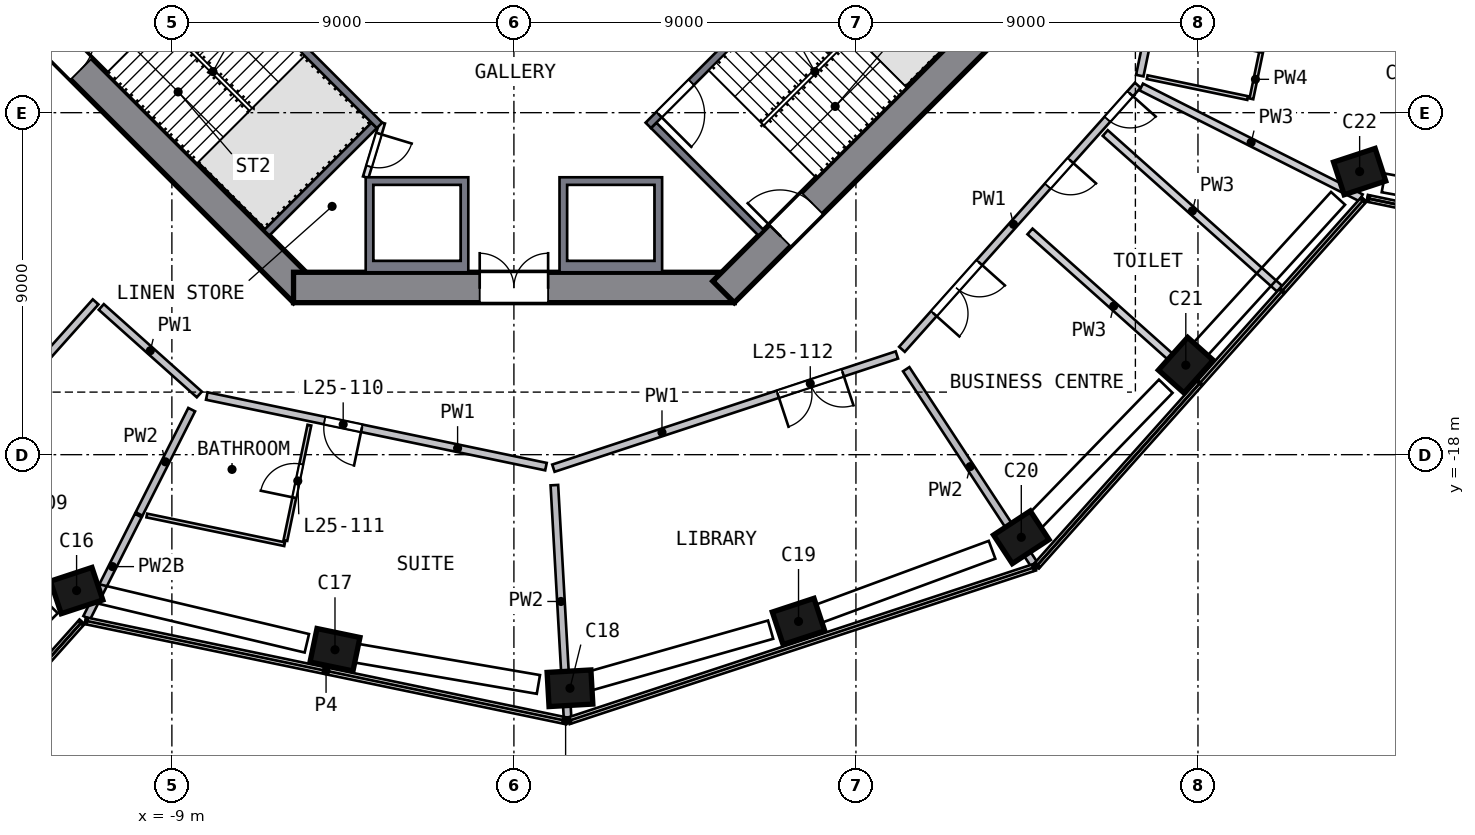
"""IFC4 building model, lengths in metres.
Left out: names, types, materials, properties, quantities, classifications, styles, units other than length and angle.
Written with IfcOpenShell. Run it as: python <this file> out.ifc"""

import sys

from ifc_helpers import new_model, si_unit, direction, frame, frame_2d, origin, origin_2d, place, context, subcontext, project, spatial, polyline, rectangle, outline, extrude, element, fill, save


model = new_model("IFC4")
c1 = context("Model", 3, precision=1e-05, world=origin(), true_north=direction((0.0, 1.0)))
c2 = subcontext(c1, "Body", "Model", "MODEL_VIEW")
j1 = project(units=[si_unit("LENGTHUNIT", "METRE"), si_unit("PLANEANGLEUNIT", "RADIAN")], contexts=[c1])
p1 = place(None, origin())
s1 = spatial("IfcSite", under=j1, at=p1, CompositionType="ELEMENT")
p2 = place(p1, origin())
s2 = spatial("IfcBuilding", under=s1, at=p2, CompositionType="ELEMENT")
p3 = place(p2, frame((0.0, 0.0, 107.0)))
s3 = spatial("IfcBuildingStorey", under=s2, at=p3, CompositionType="ELEMENT", Elevation=107.0)
p4 = place(p3, frame((-11.604, -21.525, 0.0), z_axis=(0.080137214, -0.042360729, 0.995883324), x_axis=(-0.946654036, -0.31608699, 0.062730784)))
e1 = element("IfcColumn", 1, at=p4, inside=s3, PredefinedType="COLUMN", context=c2, shape_type="SweptSolid", body=[
    extrude(rectangle(XDim=1.15, YDim=0.9, at=origin_2d()), origin(), (0.0, 0.0, 1.0), 4.207),
])
p5 = place(p3, frame((-4.812, -23.113, 0.0), z_axis=(0.085905551, -0.017123066, 0.996156131), x_axis=(0.975259529, -0.20296904, -0.087592353)))
e2 = element("IfcColumn", 2, at=p5, inside=s3, PredefinedType="COLUMN", context=c2, shape_type="SweptSolid", body=[
    extrude(rectangle(XDim=1.15, YDim=0.9, at=origin_2d()), origin(), (0.0, 0.0, 1.0), 4.206),
])
p6 = place(p3, frame((1.367, -24.154, 0.0), z_axis=(0.089545204, 0.005861352, 0.995965512), x_axis=(-0.994352891, -0.056658618, 0.089733658)))
e3 = element("IfcColumn", 3, at=p6, inside=s3, PredefinedType="COLUMN", context=c2, shape_type="SweptSolid", body=[
    extrude(rectangle(XDim=1.15, YDim=0.9, at=origin_2d()), origin(), (0.0, 0.0, 1.0), 4.207),
])
p7 = place(p3, frame((7.389, -22.422, 0.0), z_axis=(0.08294545, 0.02809349, 0.996158024), x_axis=(0.946173645, 0.311587523, -0.087570825)))
e4 = element("IfcColumn", 4, at=p7, inside=s3, PredefinedType="COLUMN", context=c2, shape_type="SweptSolid", body=[
    extrude(rectangle(XDim=1.15, YDim=0.9, at=origin_2d()), origin(), (0.0, 0.0, 1.0), 4.206),
])
p8 = place(p3, frame((13.261, -20.234, 0.0), z_axis=(0.074688522, 0.049792348, 0.995963025), x_axis=(-0.833327402, -0.545443267, 0.089761257)))
e5 = element("IfcColumn", 5, at=p8, inside=s3, PredefinedType="COLUMN", context=c2, shape_type="SweptSolid", body=[
    extrude(rectangle(XDim=1.15, YDim=0.9, at=origin_2d()), origin(), (0.0, 0.0, 1.0), 4.207),
])
p9 = place(p3, frame((17.61, -15.723, 0.0), z_axis=(0.057812061, 0.065822166, 0.996155213), x_axis=(0.663669485, 0.742878568, -0.087602791)))
e6 = element("IfcColumn", 6, at=p9, inside=s3, PredefinedType="COLUMN", context=c2, shape_type="SweptSolid", body=[
    extrude(rectangle(XDim=1.15, YDim=0.9, at=origin_2d()), origin(), (0.0, 0.0, 1.0), 4.206),
])
p10 = place(p3, frame((22.208, -10.65, 0.0), z_axis=(0.038760753, 0.082627714, 0.995826423), x_axis=(-0.9491427, -0.308570905, 0.062547039)))
e7 = element("IfcColumn", 7, at=p10, inside=s3, PredefinedType="COLUMN", context=c2, shape_type="SweptSolid", body=[
    extrude(rectangle(XDim=1.15, YDim=0.9, at=origin_2d()), origin(), (0.0, 0.0, 1.0), 4.208),
])
p11 = place(p3, frame((-13.717, -5.516, 0.0), z_axis=(0.0, 0.0, 1.0), x_axis=(0.707106781, -0.707106781, 0.0)))
e8 = element("IfcWall", 8, at=p11, inside=s3, PredefinedType="SHEAR", context=c2, shape_type="SweptSolid", body=[
    extrude(rectangle(XDim=11.598, YDim=0.8, at=frame_2d((5.799, 0.0))), origin(), (0.0, 0.0, 1.0), 4.5),
])
p12 = place(p11, frame((2.099, 0.0, 0.0)))
e9 = element("IfcOpeningElement", 9, at=p12, cuts=e8, PredefinedType="OPENING", context=c2, shape_type="SweptSolid", body=[
    extrude(rectangle(XDim=1.2, YDim=2.1, at=frame_2d((0.6, 1.05))), frame((0.0, 0.41, 0.0), z_axis=(0.0, -1.0, 0.0), x_axis=(1.0, 0.0, 0.0)), (0.0, 0.0, 1.0), 0.82),
])
p13 = place(p3, frame((-5.799, -13.6, 0.0), z_axis=(0.0, 0.0, 1.0), x_axis=(1.0, 0.0, 0.0)))
e10 = element("IfcWall", 10, at=p13, inside=s3, PredefinedType="SHEAR", context=c2, shape_type="SweptSolid", body=[
    extrude(rectangle(XDim=11.598, YDim=0.8, at=frame_2d((5.799, 0.0))), origin(), (0.0, 0.0, 1.0), 4.5),
])
p14 = place(p13, frame((4.899, 0.0, 0.0)))
e11 = element("IfcOpeningElement", 11, at=p14, cuts=e10, PredefinedType="OPENING", context=c2, shape_type="SweptSolid", body=[
    extrude(rectangle(XDim=1.8, YDim=2.1, at=frame_2d((0.9, 1.05))), frame((0.0, 0.41, 0.0), z_axis=(0.0, -1.0, 0.0), x_axis=(1.0, 0.0, 0.0)), (0.0, 0.0, 1.0), 0.82),
])
p15 = place(p3, frame((5.516, -13.717, 0.0), z_axis=(0.0, 0.0, 1.0), x_axis=(0.707106781, 0.707106781, 0.0)))
e12 = element("IfcWall", 12, at=p15, inside=s3, PredefinedType="SHEAR", context=c2, shape_type="SweptSolid", body=[
    extrude(rectangle(XDim=11.598, YDim=0.8, at=frame_2d((5.799, 0.0))), origin(), (0.0, 0.0, 1.0), 4.5),
])
p16 = place(p15, frame((2.099, 0.0, 0.0)))
e13 = element("IfcOpeningElement", 13, at=p16, cuts=e12, PredefinedType="OPENING", context=c2, shape_type="SweptSolid", body=[
    extrude(rectangle(XDim=1.2, YDim=2.1, at=frame_2d((0.6, 1.05))), frame((0.0, 0.41, 0.0), z_axis=(0.0, -1.0, 0.0), x_axis=(1.0, 0.0, 0.0)), (0.0, 0.0, 1.0), 0.82),
])
p17 = place(p3, origin())
e14 = element("IfcWall", 14, at=p17, inside=s3, PredefinedType="SOLIDWALL", context=c2, shape_type="SweptSolid", body=[
    extrude(outline(polyline([(-1.2, -13.2), (-3.9, -13.2), (-3.9, -10.7), (-1.2, -10.7), (-1.2, -13.2)]), holes=[polyline([(-3.7, -10.9), (-3.7, -12.9), (-1.4, -12.9), (-1.4, -10.9), (-3.7, -10.9)])]), origin(), (0.0, 0.0, 1.0), 4.19),
])
p18 = place(p3, origin())
e15 = element("IfcWall", 15, at=p18, inside=s3, PredefinedType="SOLIDWALL", context=c2, shape_type="SweptSolid", body=[
    extrude(outline(polyline([(3.9, -10.7), (3.9, -13.2), (1.2, -13.2), (1.2, -10.7), (3.9, -10.7)]), holes=[polyline([(1.4, -12.9), (3.7, -12.9), (3.7, -10.9), (1.4, -10.9), (1.4, -12.9)])]), origin(), (0.0, 0.0, 1.0), 4.19),
])
p19 = place(p3, frame((-3.535, -9.334, 0.0), z_axis=(0.0, 0.0, 1.0), x_axis=(-0.707106781, 0.707106781, 0.0)))
e16 = element("IfcWall", 16, at=p19, inside=s3, PredefinedType="SOLIDWALL", context=c2, shape_type="SweptSolid", body=[
    extrude(rectangle(XDim=8.2, YDim=0.2, at=frame_2d((4.1, 0.0))), origin(), (0.0, 0.0, 1.0), 4.19),
])
p20 = place(p19, frame((6.6, 0.0, 0.0)))
e17 = element("IfcOpeningElement", 17, at=p20, cuts=e16, PredefinedType="OPENING", context=c2, shape_type="SweptSolid", body=[
    extrude(rectangle(XDim=1.2, YDim=2.1, at=frame_2d((0.6, 1.05))), frame((0.0, 0.11, 0.0), z_axis=(0.0, -1.0, 0.0), x_axis=(1.0, 0.0, 0.0)), (0.0, 0.0, 1.0), 0.22),
])
p21 = place(p3, frame((-3.677, -9.334, 0.0), z_axis=(0.0, 0.0, 1.0), x_axis=(-0.707106781, -0.707106781, 0.0)))
e18 = element("IfcWall", 18, at=p21, inside=s3, PredefinedType="SOLIDWALL", context=c2, shape_type="SweptSolid", body=[
    extrude(rectangle(XDim=4.0, YDim=0.2, at=frame_2d((2.0, 0.0))), origin(), (0.0, 0.0, 1.0), 4.19),
])
p22 = place(p3, frame((9.334, -3.535, 0.0), z_axis=(0.0, 0.0, 1.0), x_axis=(-0.707106781, -0.707106781, 0.0)))
e19 = element("IfcWall", 19, at=p22, inside=s3, PredefinedType="SOLIDWALL", context=c2, shape_type="SweptSolid", body=[
    extrude(rectangle(XDim=8.2, YDim=0.2, at=frame_2d((4.1, 0.0))), origin(), (0.0, 0.0, 1.0), 4.19),
])
p23 = place(p22, frame((6.6, 0.0, 0.0)))
e20 = element("IfcOpeningElement", 20, at=p23, cuts=e19, PredefinedType="OPENING", context=c2, shape_type="SweptSolid", body=[
    extrude(rectangle(XDim=1.2, YDim=2.1, at=frame_2d((0.6, 1.05))), frame((0.0, 0.11, 0.0), z_axis=(0.0, -1.0, 0.0), x_axis=(1.0, 0.0, 0.0)), (0.0, 0.0, 1.0), 0.22),
])
p24 = place(p3, frame((3.677, -9.334, 0.0), z_axis=(0.0, 0.0, 1.0), x_axis=(0.707106781, -0.707106781, 0.0)))
e21 = element("IfcWall", 21, at=p24, inside=s3, PredefinedType="SOLIDWALL", context=c2, shape_type="SweptSolid", body=[
    extrude(rectangle(XDim=4.0, YDim=0.2, at=frame_2d((2.0, 0.0))), origin(), (0.0, 0.0, 1.0), 4.19),
])
p25 = place(p3, frame((-3.465, -9.263, 0.0), z_axis=(0.0, 0.0, 1.0), x_axis=(-0.289808785, -0.957084567, 0.0)))
e22 = element("IfcWall", 22, at=p25, inside=s3, PredefinedType="PARTITIONING", context=c2, shape_type="SweptSolid", body=[
    extrude(rectangle(XDim=1.501, YDim=0.15, at=frame_2d((0.75, 0.0))), origin(), (0.0, 0.0, 1.0), 4.19),
])
p26 = place(p25, frame((0.301, 0.0, 0.0)))
e23 = element("IfcOpeningElement", 23, at=p26, cuts=e22, PredefinedType="OPENING", context=c2, shape_type="SweptSolid", body=[
    extrude(rectangle(XDim=0.9, YDim=2.1, at=frame_2d((0.45, 1.05))), frame((0.0, 0.085, 0.0), z_axis=(0.0, -1.0, 0.0), x_axis=(1.0, 0.0, 0.0)), (0.0, 0.0, 1.0), 0.17),
])
p27 = place(p3, frame((-11.007, -13.979, 0.0), z_axis=(0.0, 0.0, 1.0), x_axis=(-0.666010793, -0.745942105, 0.0)))
e24 = element("IfcWall", 24, at=p27, inside=s3, PredefinedType="SOLIDWALL", context=c2, shape_type="SweptSolid", body=[
    extrude(rectangle(XDim=16.573, YDim=0.2, at=frame_2d((8.287, 0.0))), origin(), (0.0, 0.0, 1.0), 4.19),
])
p28 = place(p27, frame((4.15, 0.0, 0.0)))
e25 = element("IfcOpeningElement", 25, at=p28, cuts=e24, PredefinedType="OPENING", context=c2, shape_type="SweptSolid", body=[
    extrude(rectangle(XDim=1.8, YDim=2.1, at=frame_2d((0.9, 1.05))), frame((0.0, 0.11, 0.0), z_axis=(0.0, -1.0, 0.0), x_axis=(1.0, 0.0, 0.0)), (0.0, 0.0, 1.0), 0.22),
])
p29 = place(p3, frame((-10.857, -14.113, 0.0), z_axis=(0.0, 0.0, 1.0), x_axis=(0.745935156, -0.666018575, 0.0)))
e26 = element("IfcWall", 26, at=p29, inside=s3, PredefinedType="SOLIDWALL", context=c2, shape_type="SweptSolid", body=[
    extrude(rectangle(XDim=3.458, YDim=0.2, at=frame_2d((1.729, 0.0))), origin(), (0.0, 0.0, 1.0), 4.19),
])
p30 = place(p3, frame((0.843, -18.315, 0.0), z_axis=(0.0, 0.0, 1.0), x_axis=(-0.979008482, 0.203819508, 0.0)))
e27 = element("IfcWall", 27, at=p30, inside=s3, PredefinedType="SOLIDWALL", context=c2, shape_type="SweptSolid", body=[
    extrude(rectangle(XDim=9.117, YDim=0.2, at=frame_2d((4.558, 0.0))), origin(), (0.0, 0.0, 1.0), 4.19),
])
p31 = place(p30, frame((4.95, 0.0, 0.0)))
e28 = element("IfcOpeningElement", 28, at=p31, cuts=e27, PredefinedType="OPENING", context=c2, shape_type="SweptSolid", body=[
    extrude(rectangle(XDim=1.0, YDim=2.1, at=frame_2d((0.5, 1.05))), frame((0.0, 0.11, 0.0), z_axis=(0.0, -1.0, 0.0), x_axis=(1.0, 0.0, 0.0)), (0.0, 0.0, 1.0), 0.22),
])
p32 = place(p3, frame((10.077, -15.377, 0.0), z_axis=(0.0, 0.0, 1.0), x_axis=(-0.949750196, -0.313008891, 0.0)))
e29 = element("IfcWall", 29, at=p32, inside=s3, PredefinedType="SOLIDWALL", context=c2, shape_type="SweptSolid", body=[
    extrude(rectangle(XDim=9.517, YDim=0.2, at=frame_2d((4.758, 0.0))), origin(), (0.0, 0.0, 1.0), 4.19),
])
p33 = place(p32, frame((1.5, 0.0, 0.0)))
e30 = element("IfcOpeningElement", 30, at=p33, cuts=e29, PredefinedType="OPENING", context=c2, shape_type="SweptSolid", body=[
    extrude(rectangle(XDim=1.8, YDim=2.1, at=frame_2d((0.9, 1.05))), frame((0.0, 0.11, 0.0), z_axis=(0.0, -1.0, 0.0), x_axis=(1.0, 0.0, 0.0)), (0.0, 0.0, 1.0), 0.22),
])
p34 = place(p3, frame((16.416, -8.278, 0.0), z_axis=(0.0, 0.0, 1.0), x_axis=(-0.666014728, -0.745938592, 0.0)))
e31 = element("IfcWall", 31, at=p34, inside=s3, PredefinedType="SOLIDWALL", context=c2, shape_type="SweptSolid", body=[
    extrude(rectangle(XDim=9.317, YDim=0.2, at=frame_2d((4.658, 0.0))), origin(), (0.0, 0.0, 1.0), 4.19),
])
p35 = place(p34, frame((6.258, 0.0, 0.0)))
e32 = element("IfcOpeningElement", 32, at=p35, cuts=e31, PredefinedType="OPENING", context=c2, shape_type="SweptSolid", body=[
    extrude(rectangle(XDim=1.8, YDim=2.1, at=frame_2d((0.9, 1.05))), frame((0.0, 0.11, 0.0), z_axis=(0.0, -1.0, 0.0), x_axis=(1.0, 0.0, 0.0)), (0.0, 0.0, 1.0), 0.22),
])
p36 = place(p34, frame((2.658, 0.0, 0.0)))
e33 = element("IfcOpeningElement", 33, at=p36, cuts=e31, PredefinedType="OPENING", context=c2, shape_type="SweptSolid", body=[
    extrude(rectangle(XDim=0.9, YDim=2.1, at=frame_2d((0.45, 1.05))), frame((0.0, 0.11, 0.0), z_axis=(0.0, -1.0, 0.0), x_axis=(1.0, 0.0, 0.0)), (0.0, 0.0, 1.0), 0.22),
])
p37 = place(p34, frame((0.3, 0.0, 0.0)))
e34 = element("IfcOpeningElement", 34, at=p37, cuts=e31, PredefinedType="OPENING", context=c2, shape_type="SweptSolid", body=[
    extrude(rectangle(XDim=0.9, YDim=2.1, at=frame_2d((0.45, 1.05))), frame((0.0, 0.11, 0.0), z_axis=(0.0, -1.0, 0.0), x_axis=(1.0, 0.0, 0.0)), (0.0, 0.0, 1.0), 0.22),
])
p38 = place(p3, frame((16.469, -8.025, 0.0), z_axis=(0.0, 0.0, 1.0), x_axis=(0.203787936, 0.979015055, 0.0)))
e35 = element("IfcWall", 35, at=p38, inside=s3, PredefinedType="SOLIDWALL", context=c2, shape_type="SweptSolid", body=[
    extrude(rectangle(XDim=3.4, YDim=0.2, at=frame_2d((1.7, 0.0))), origin(), (0.0, 0.0, 1.0), 4.19),
])
p39 = place(p3, frame((-9.884, -19.602, 0.0), z_axis=(0.0, 0.0, 1.0), x_axis=(-0.450291801, -0.892881456, 0.0)))
e36 = element("IfcWall", 36, at=p39, inside=s3, PredefinedType="SOLIDWALL", context=c2, shape_type="SweptSolid", body=[
    extrude(rectangle(XDim=3.011, YDim=0.2, at=frame_2d((1.506, 0.0))), origin(), (0.0, 0.0, 1.0), 3.69),
])
p40 = place(p3, frame((-8.479, -16.815, 0.0), z_axis=(0.0, 0.0, 1.0), x_axis=(-0.450228455, -0.892913399, 0.0)))
e37 = element("IfcWall", 37, at=p40, inside=s3, PredefinedType="SOLIDWALL", context=c2, shape_type="SweptSolid", body=[
    extrude(rectangle(XDim=3.075, YDim=0.2, at=frame_2d((1.537, 0.0))), origin(), (0.0, 0.0, 1.0), 4.19),
])
p41 = place(p3, frame((1.411, -24.924, 0.0), z_axis=(0.0, 0.0, 1.0), x_axis=(-0.056497587, 0.998402736, 0.0)))
e38 = element("IfcWall", 38, at=p41, inside=s3, PredefinedType="SOLIDWALL", context=c2, shape_type="SweptSolid", body=[
    extrude(rectangle(XDim=6.132, YDim=0.2, at=frame_2d((3.066, 0.0))), origin(), (0.0, 0.0, 1.0), 4.19),
])
p42 = place(p3, frame((10.323, -15.751, 0.0), z_axis=(0.0, 0.0, 1.0), x_axis=(0.54815977, -0.836373641, 0.0)))
e39 = element("IfcWall", 39, at=p42, inside=s3, PredefinedType="SOLIDWALL", context=c2, shape_type="SweptSolid", body=[
    extrude(rectangle(XDim=6.132, YDim=0.2, at=frame_2d((3.066, 0.0))), origin(), (0.0, 0.0, 1.0), 4.19),
])
p43 = place(p3, frame((-6.034, -20.356, 0.0), z_axis=(0.0, 0.0, 1.0), x_axis=(-0.979011665, 0.203804219, 0.0)))
e40 = element("IfcWall", 40, at=p43, inside=s3, PredefinedType="PARTITIONING", context=c2, shape_type="SweptSolid", body=[
    extrude(rectangle(XDim=3.704, YDim=0.1, at=frame_2d((1.852, 0.0))), origin(), (0.0, 0.0, 1.0), 4.19),
])
p44 = place(p3, frame((-6.013, -20.258, 0.0), z_axis=(0.0, 0.0, 1.0), x_axis=(0.203819018, 0.979008584, 0.0)))
e41 = element("IfcWall", 41, at=p44, inside=s3, PredefinedType="PARTITIONING", context=c2, shape_type="SweptSolid", body=[
    extrude(rectangle(XDim=3.1, YDim=0.1, at=frame_2d((1.55, 0.0))), origin(), (0.0, 0.0, 1.0), 4.19),
])
p45 = place(p44, frame((1.15, 0.0, 0.0)))
e42 = element("IfcOpeningElement", 42, at=p45, cuts=e41, PredefinedType="OPENING", context=c2, shape_type="SweptSolid", body=[
    extrude(rectangle(XDim=0.9, YDim=2.1, at=frame_2d((0.45, 1.05))), frame((0.0, 0.06, 0.0), z_axis=(0.0, -1.0, 0.0), x_axis=(1.0, 0.0, 0.0)), (0.0, 0.0, 1.0), 0.12),
])
p46 = place(p3, frame((19.308, -8.616, 0.0), z_axis=(0.0, 0.0, 1.0), x_axis=(-0.979009748, 0.203813427, 0.0)))
e43 = element("IfcWall", 43, at=p46, inside=s3, PredefinedType="PARTITIONING", context=c2, shape_type="SweptSolid", body=[
    extrude(rectangle(XDim=2.7, YDim=0.1, at=frame_2d((1.35, 0.0))), origin(), (0.0, 0.0, 1.0), 4.19),
])
p47 = place(p3, frame((19.406, -8.636, 0.0), z_axis=(0.0, 0.0, 1.0), x_axis=(0.203768415, 0.979019118, 0.0)))
e44 = element("IfcWall", 44, at=p47, inside=s3, PredefinedType="PARTITIONING", context=c2, shape_type="SweptSolid", body=[
    extrude(rectangle(XDim=3.2, YDim=0.1, at=frame_2d((1.6, 0.0))), origin(), (0.0, 0.0, 1.0), 4.19),
])
p48 = place(p47, frame((1.25, 0.0, 0.0)))
e45 = element("IfcOpeningElement", 45, at=p48, cuts=e44, PredefinedType="OPENING", context=c2, shape_type="SweptSolid", body=[
    extrude(rectangle(XDim=0.9, YDim=2.1, at=frame_2d((0.45, 1.05))), frame((0.0, 0.06, 0.0), z_axis=(0.0, -1.0, 0.0), x_axis=(1.0, 0.0, 0.0)), (0.0, 0.0, 1.0), 0.12),
])
p49 = place(p3, frame((13.58, -12.125, 0.0), z_axis=(0.0, 0.0, 1.0), x_axis=(0.745931057, -0.666023167, 0.0)))
e46 = element("IfcWall", 46, at=p49, inside=s3, PredefinedType="SOLIDWALL", context=c2, shape_type="SweptSolid", body=[
    extrude(rectangle(XDim=5.903, YDim=0.2, at=frame_2d((2.951, 0.0))), origin(), (0.0, 0.0, 1.0), 4.19),
])
p50 = place(p3, frame((15.56, -9.536, 0.0), z_axis=(0.0, 0.0, 1.0), x_axis=(0.745951044, -0.666000781, 0.0)))
e47 = element("IfcWall", 47, at=p50, inside=s3, PredefinedType="SOLIDWALL", context=c2, shape_type="SweptSolid", body=[
    extrude(rectangle(XDim=6.15, YDim=0.2, at=frame_2d((3.075, 0.0))), origin(), (0.0, 0.0, 1.0), 4.19),
])
p51 = place(p3, frame((16.508, -8.324, 0.0), z_axis=(0.0, 0.0, 1.0), x_axis=(0.89289126, -0.45027236, 0.0)))
e48 = element("IfcWall", 48, at=p51, inside=s3, PredefinedType="SOLIDWALL", context=c2, shape_type="SweptSolid", body=[
    extrude(rectangle(XDim=6.476, YDim=0.2, at=frame_2d((3.238, 0.0))), origin(), (0.0, 0.0, 1.0), 4.19),
])
p52 = place(p23, origin())
e49 = element("IfcDoor", 49, at=p52, inside=s3, OperationType="SINGLE_SWING_RIGHT", PredefinedType="DOOR", context=c2, shape_type="SweptSolid", body=[
    extrude(rectangle(XDim=1.2, YDim=2.1, at=frame_2d((0.6, 1.05))), frame((0.0, 0.025, 0.0), z_axis=(0.0, -1.0, 0.0), x_axis=(1.0, 0.0, 0.0)), (0.0, 0.0, 1.0), 0.05),
])
fill(e20, e49)
p53 = place(p14, origin())
e50 = element("IfcDoor", 50, at=p53, inside=s3, OperationType="DOUBLE_DOOR_SINGLE_SWING", PredefinedType="DOOR", context=c2, shape_type="SweptSolid", body=[
    extrude(rectangle(XDim=1.8, YDim=2.1, at=frame_2d((0.9, 1.05))), frame((0.0, 0.025, 0.0), z_axis=(0.0, -1.0, 0.0), x_axis=(1.0, 0.0, 0.0)), (0.0, 0.0, 1.0), 0.05),
])
fill(e11, e50)
p54 = place(p12, origin())
e51 = element("IfcDoor", 51, at=p54, inside=s3, OperationType="SINGLE_SWING_LEFT", PredefinedType="DOOR", context=c2, shape_type="SweptSolid", body=[
    extrude(rectangle(XDim=1.2, YDim=2.1, at=frame_2d((0.6, 1.05))), frame((0.0, 0.025, 0.0), z_axis=(0.0, -1.0, 0.0), x_axis=(1.0, 0.0, 0.0)), (0.0, 0.0, 1.0), 0.05),
])
fill(e9, e51)
p55 = place(p16, origin())
e52 = element("IfcDoor", 52, at=p55, inside=s3, OperationType="SINGLE_SWING_LEFT", PredefinedType="DOOR", context=c2, shape_type="SweptSolid", body=[
    extrude(rectangle(XDim=1.2, YDim=2.1, at=frame_2d((0.6, 1.05))), frame((0.0, 0.025, 0.0), z_axis=(0.0, -1.0, 0.0), x_axis=(1.0, 0.0, 0.0)), (0.0, 0.0, 1.0), 0.05),
])
fill(e13, e52)
p56 = place(p26, origin())
e53 = element("IfcDoor", 53, at=p56, inside=s3, OperationType="SINGLE_SWING_LEFT", PredefinedType="DOOR", context=c2, shape_type="SweptSolid", body=[
    extrude(rectangle(XDim=0.9, YDim=2.1, at=frame_2d((0.45, 1.05))), frame((0.0, 0.025, 0.0), z_axis=(0.0, -1.0, 0.0), x_axis=(1.0, 0.0, 0.0)), (0.0, 0.0, 1.0), 0.05),
])
fill(e23, e53)
p57 = place(p31, origin())
e54 = element("IfcDoor", 54, at=p57, inside=s3, OperationType="SINGLE_SWING_LEFT", PredefinedType="DOOR", context=c2, shape_type="SweptSolid", body=[
    extrude(rectangle(XDim=1.0, YDim=2.1, at=frame_2d((0.5, 1.05))), frame((0.0, 0.025, 0.0), z_axis=(0.0, -1.0, 0.0), x_axis=(1.0, 0.0, 0.0)), (0.0, 0.0, 1.0), 0.05),
])
fill(e28, e54)
p58 = place(p45, origin())
e55 = element("IfcDoor", 55, at=p58, inside=s3, OperationType="SINGLE_SWING_LEFT", PredefinedType="DOOR", context=c2, shape_type="SweptSolid", body=[
    extrude(rectangle(XDim=0.9, YDim=2.1, at=frame_2d((0.45, 1.05))), frame((0.0, 0.025, 0.0), z_axis=(0.0, -1.0, 0.0), x_axis=(1.0, 0.0, 0.0)), (0.0, 0.0, 1.0), 0.05),
])
fill(e42, e55)
p59 = place(p33, origin())
e56 = element("IfcDoor", 56, at=p59, inside=s3, OperationType="DOUBLE_DOOR_SINGLE_SWING", PredefinedType="DOOR", context=c2, shape_type="SweptSolid", body=[
    extrude(rectangle(XDim=1.8, YDim=2.1, at=frame_2d((0.9, 1.05))), frame((0.0, 0.025, 0.0), z_axis=(0.0, -1.0, 0.0), x_axis=(1.0, 0.0, 0.0)), (0.0, 0.0, 1.0), 0.05),
])
fill(e30, e56)
p60 = place(p35, origin())
e57 = element("IfcDoor", 57, at=p60, inside=s3, OperationType="DOUBLE_DOOR_SINGLE_SWING", PredefinedType="DOOR", context=c2, shape_type="SweptSolid", body=[
    extrude(rectangle(XDim=1.8, YDim=2.1, at=frame_2d((0.9, 1.05))), frame((0.0, 0.025, 0.0), z_axis=(0.0, -1.0, 0.0), x_axis=(1.0, 0.0, 0.0)), (0.0, 0.0, 1.0), 0.05),
])
fill(e32, e57)
p61 = place(p48, origin())
e58 = element("IfcDoor", 58, at=p61, inside=s3, OperationType="SINGLE_SWING_LEFT", PredefinedType="DOOR", context=c2, shape_type="SweptSolid", body=[
    extrude(rectangle(XDim=0.9, YDim=2.1, at=frame_2d((0.45, 1.05))), frame((0.0, 0.025, 0.0), z_axis=(0.0, -1.0, 0.0), x_axis=(1.0, 0.0, 0.0)), (0.0, 0.0, 1.0), 0.05),
])
fill(e45, e58)
p62 = place(p36, origin())
e59 = element("IfcDoor", 59, at=p62, inside=s3, OperationType="SINGLE_SWING_LEFT", PredefinedType="DOOR", context=c2, shape_type="SweptSolid", body=[
    extrude(rectangle(XDim=0.9, YDim=2.1, at=frame_2d((0.45, 1.05))), frame((0.0, 0.025, 0.0), z_axis=(0.0, -1.0, 0.0), x_axis=(1.0, 0.0, 0.0)), (0.0, 0.0, 1.0), 0.05),
])
fill(e33, e59)
p63 = place(p37, origin())
e60 = element("IfcDoor", 60, at=p63, inside=s3, OperationType="SINGLE_SWING_LEFT", PredefinedType="DOOR", context=c2, shape_type="SweptSolid", body=[
    extrude(rectangle(XDim=0.9, YDim=2.1, at=frame_2d((0.45, 1.05))), frame((0.0, 0.025, 0.0), z_axis=(0.0, -1.0, 0.0), x_axis=(1.0, 0.0, 0.0)), (0.0, 0.0, 1.0), 0.05),
])
fill(e34, e60)
save(model, sys.argv[1])
